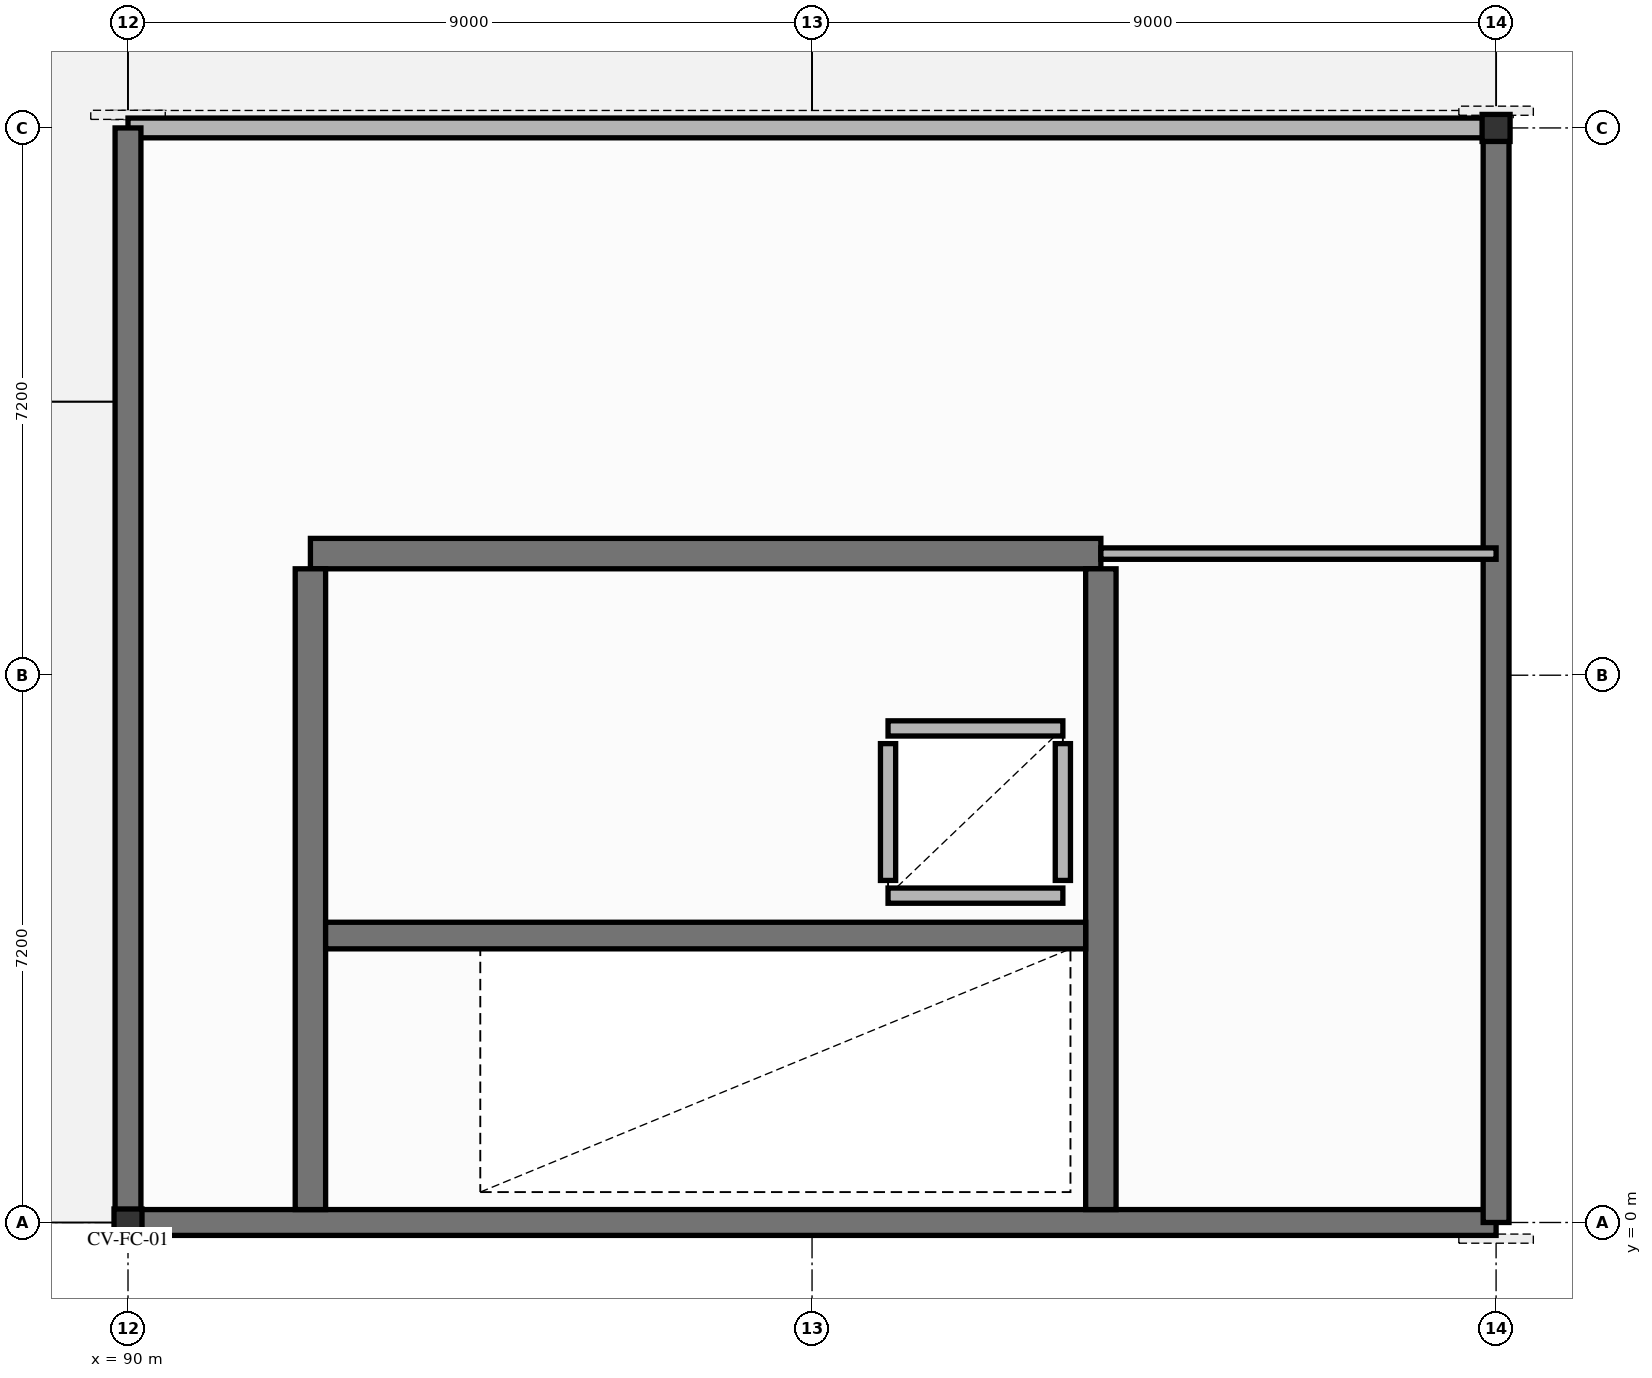
"""IFC4 building model, lengths in metres.
Left out: names, types, materials, properties, quantities, classifications, styles, units other than length and angle.
Written with IfcOpenShell. Run it as: python <this file> out.ifc"""

import sys

from ifc_helpers import new_model, si_unit, direction, frame, frame_2d, origin, origin_2d, place, context, subcontext, project, spatial, polyline, rectangle, i_section, outline, extrude, element, fill, save


model = new_model("IFC4")
c1 = context("Model", 3, precision=1e-05, world=origin(), true_north=direction((0.0, 1.0)))
c2 = subcontext(c1, "Body", "Model", "MODEL_VIEW")
j1 = project(units=[si_unit("LENGTHUNIT", "METRE"), si_unit("PLANEANGLEUNIT", "RADIAN")], contexts=[c1])
p1 = place(None, origin())
s1 = spatial("IfcSite", under=j1, at=p1, CompositionType="ELEMENT")
p2 = place(p1, origin())
s2 = spatial("IfcBuilding", under=s1, at=p2, CompositionType="ELEMENT")
p3 = place(p2, frame((0.0, 0.0, 8.94)))
s3 = spatial("IfcBuildingStorey", under=s2, at=p3, CompositionType="ELEMENT", Elevation=8.94)
p4 = place(p3, frame((90.0, 0.0, 0.0), z_axis=(0.0, 0.0, 1.0), x_axis=(1.0, 0.0, 0.0)))
e1 = element("IfcColumn", 1, at=p4, inside=s3, PredefinedType="COLUMN", context=c2, shape_type="SweptSolid", body=[
    extrude(i_section(OverallWidth=0.368, OverallDepth=0.356, WebThickness=0.011, FlangeThickness=0.018, at=origin_2d()), origin(), (0.0, 0.0, 1.0), 3.117),
])
p5 = place(p3, frame((108.0, 14.4, 0.0), z_axis=(0.0, 0.0, 1.0), x_axis=(1.0, 0.0, 0.0)))
e2 = element("IfcColumn", 2, at=p5, inside=s3, PredefinedType="COLUMN", context=c2, shape_type="SweptSolid", body=[
    extrude(i_section(OverallWidth=0.368, OverallDepth=0.356, WebThickness=0.011, FlangeThickness=0.018, at=origin_2d()), origin(), (0.0, 0.0, 1.0), 1.052),
])
p6 = place(p2, frame((0.0, 0.0, 5.1)))
s4 = spatial("IfcBuildingStorey", under=s2, at=p6, CompositionType="ELEMENT", Elevation=5.1)
p7 = place(p6, frame((81.0, 0.0, 0.0), z_axis=(0.0, 0.0, 1.0), x_axis=(1.0, 0.0, 0.0)))
e3 = element("IfcWall", 3, at=p7, inside=s4, PredefinedType="SOLIDWALL", context=c2, shape_type="SweptSolid", body=[
    extrude(rectangle(XDim=9.0, YDim=0.26, at=frame_2d((4.5, 0.0))), origin(), (0.0, 0.0, 1.0), 6.331),
])
p8 = place(p7, frame((1.8, 0.0, 0.65)))
e4 = element("IfcOpeningElement", 4, at=p8, cuts=e3, PredefinedType="OPENING", context=c2, shape_type="SweptSolid", body=[
    extrude(rectangle(XDim=2.2, YDim=1.95, at=frame_2d((1.1, 0.975))), frame((0.0, 0.14, 0.0), z_axis=(0.0, -1.0, 0.0), x_axis=(1.0, 0.0, 0.0)), (0.0, 0.0, 1.0), 0.28),
])
p9 = place(p7, frame((5.4, 0.0, 0.65)))
e5 = element("IfcOpeningElement", 5, at=p9, cuts=e3, PredefinedType="OPENING", context=c2, shape_type="SweptSolid", body=[
    extrude(rectangle(XDim=1.85, YDim=1.75, at=frame_2d((0.925, 0.875))), frame((0.0, 0.14, 0.0), z_axis=(0.0, -1.0, 0.0), x_axis=(1.0, 0.0, 0.0)), (0.0, 0.0, 1.0), 0.28),
])
p10 = place(p3, frame((90.0, 0.0, 0.0), z_axis=(0.0, 0.0, 1.0), x_axis=(1.0, 0.0, 0.0)))
e6 = element("IfcWall", 6, at=p10, inside=s3, PredefinedType="SOLIDWALL", context=c2, shape_type="SweptSolid", body=[
    extrude(rectangle(XDim=18.0, YDim=0.34, at=frame_2d((9.0, 0.0))), origin(), (0.0, 0.0, 1.0), 5.54),
])
p11 = place(p10, frame((4.8, 0.0, 0.701)))
e7 = element("IfcOpeningElement", 7, at=p11, cuts=e6, PredefinedType="OPENING", context=c2, shape_type="SweptSolid", body=[
    extrude(rectangle(XDim=1.85, YDim=1.75, at=frame_2d((0.925, 0.875))), frame((0.0, 0.18, 0.0), z_axis=(0.0, -1.0, 0.0), x_axis=(1.0, 0.0, 0.0)), (0.0, 0.0, 1.0), 0.36),
])
p12 = place(p10, frame((14.4, 0.0, 0.701)))
e8 = element("IfcOpeningElement", 8, at=p12, cuts=e6, PredefinedType="OPENING", context=c2, shape_type="SweptSolid", body=[
    extrude(rectangle(XDim=1.85, YDim=1.75, at=frame_2d((0.925, 0.875))), frame((0.0, 0.18, 0.0), z_axis=(0.0, -1.0, 0.0), x_axis=(1.0, 0.0, 0.0)), (0.0, 0.0, 1.0), 0.36),
])
p13 = place(p3, frame((90.0, 14.4, 0.0), z_axis=(0.0, 0.0, 1.0), x_axis=(1.0, 0.0, 0.0)))
e9 = element("IfcWall", 9, at=p13, inside=s3, PredefinedType="SOLIDWALL", context=c2, shape_type="SweptSolid", body=[
    extrude(rectangle(XDim=18.0, YDim=0.26, at=frame_2d((9.0, 0.0))), origin(), (0.0, 0.0, 1.0), 3.174),
])
p14 = place(p13, frame((3.0, 0.0, 0.9)))
e10 = element("IfcOpeningElement", 10, at=p14, cuts=e9, PredefinedType="OPENING", context=c2, shape_type="SweptSolid", body=[
    extrude(rectangle(XDim=2.2, YDim=1.95, at=frame_2d((1.1, 0.975))), frame((0.0, 0.14, 0.0), z_axis=(0.0, -1.0, 0.0), x_axis=(1.0, 0.0, 0.0)), (0.0, 0.0, 1.0), 0.28),
])
p15 = place(p13, frame((11.5, 0.0, 0.9)))
e11 = element("IfcOpeningElement", 11, at=p15, cuts=e9, PredefinedType="OPENING", context=c2, shape_type="SweptSolid", body=[
    extrude(rectangle(XDim=2.2, YDim=1.95, at=frame_2d((1.1, 0.975))), frame((0.0, 0.14, 0.0), z_axis=(0.0, -1.0, 0.0), x_axis=(1.0, 0.0, 0.0)), (0.0, 0.0, 1.0), 0.28),
])
p16 = place(p3, frame((90.0, 0.0, 0.0), z_axis=(0.0, 0.0, 1.0), x_axis=(0.0, 1.0, 0.0)))
e12 = element("IfcWall", 12, at=p16, inside=s3, PredefinedType="SOLIDWALL", context=c2, shape_type="SweptSolid", body=[
    extrude(outline(polyline([(0.0, 0.0), (14.4, 0.0), (14.4, 3.74), (0.0, 5.54), (0.0, 0.0)])), frame((0.0, 0.17, 0.0), z_axis=(0.0, -1.0, 0.0), x_axis=(1.0, 0.0, 0.0)), (0.0, 0.0, 1.0), 0.34),
])
p17 = place(p3, frame((108.0, 0.0, 0.0), z_axis=(0.0, 0.0, 1.0), x_axis=(0.0, 1.0, 0.0)))
e13 = element("IfcWall", 13, at=p17, inside=s3, PredefinedType="SOLIDWALL", context=c2, shape_type="SweptSolid", body=[
    extrude(outline(polyline([(0.0, 0.0), (14.4, 0.0), (14.4, 3.74), (0.0, 5.54), (0.0, 0.0)])), frame((0.0, 0.17, 0.0), z_axis=(0.0, -1.0, 0.0), x_axis=(1.0, 0.0, 0.0)), (0.0, 0.0, 1.0), 0.34),
])
p18 = place(p17, frame((4.2, 0.0, 0.9)))
e14 = element("IfcOpeningElement", 14, at=p18, cuts=e13, PredefinedType="OPENING", context=c2, shape_type="SweptSolid", body=[
    extrude(rectangle(XDim=1.2, YDim=2.1, at=frame_2d((0.6, 1.05))), frame((0.0, 0.18, 0.0), z_axis=(0.0, -1.0, 0.0), x_axis=(1.0, 0.0, 0.0)), (0.0, 0.0, 1.0), 0.36),
])
p19 = place(p3, frame((92.4, 8.8, 0.0), z_axis=(0.0, 0.0, 1.0), x_axis=(1.0, 0.0, 0.0)))
e15 = element("IfcWall", 15, at=p19, inside=s3, PredefinedType="SHEAR", context=c2, shape_type="SweptSolid", body=[
    extrude(rectangle(XDim=10.4, YDim=0.4, at=frame_2d((5.2, 0.0))), origin(), (0.0, 0.0, 1.0), 3.53),
])
p20 = place(p19, frame((2.4, 0.0, 0.0)))
e16 = element("IfcOpeningElement", 16, at=p20, cuts=e15, PredefinedType="OPENING", context=c2, shape_type="SweptSolid", body=[
    extrude(rectangle(XDim=1.5, YDim=2.2, at=frame_2d((0.75, 1.1))), frame((0.0, 0.21, 0.0), z_axis=(0.0, -1.0, 0.0), x_axis=(1.0, 0.0, 0.0)), (0.0, 0.0, 1.0), 0.42),
])
for number, where, z_axis, x_axis in (
    (17, (92.4, 0.17, 0.0), (0.0, 0.0, 1.0), (0.0, 1.0, 0.0)),
    (18, (102.8, 0.17, 0.0), (0.0, 0.0, 1.0), (0.0, 1.0, 0.0)),
):
    element("IfcWall", number, at=place(p3, frame(where, z_axis=z_axis, x_axis=x_axis)), inside=s3, PredefinedType="SHEAR", context=c2, shape_type="SweptSolid", body=[
        extrude(rectangle(XDim=8.43, YDim=0.4, at=frame_2d((4.215, 0.0))), origin(), (0.0, 0.0, 1.0), 3.53),
    ])
p21 = place(p3, frame((92.6, 3.775, 0.0), z_axis=(0.0, 0.0, 1.0), x_axis=(1.0, 0.0, 0.0)))
e19 = element("IfcWall", 19, at=p21, inside=s3, PredefinedType="SHEAR", context=c2, shape_type="SweptSolid", body=[
    extrude(rectangle(XDim=10.0, YDim=0.35, at=frame_2d((5.0, 0.0))), origin(), (0.0, 0.0, 1.0), 3.53),
])
p22 = place(p21, frame((0.45, 0.0, 0.0)))
e20 = element("IfcOpeningElement", 20, at=p22, cuts=e19, PredefinedType="OPENING", context=c2, shape_type="SweptSolid", body=[
    extrude(rectangle(XDim=1.05, YDim=2.2, at=frame_2d((0.525, 1.1))), frame((0.0, 0.185, 0.0), z_axis=(0.0, -1.0, 0.0), x_axis=(1.0, 0.0, 0.0)), (0.0, 0.0, 1.0), 0.37),
])
for number, where, z_axis, x_axis in (
    (21, (100.0, 4.3, 0.0), (0.0, 0.0, 1.0), (1.0, 0.0, 0.0)),
    (22, (100.0, 6.5, 0.0), (0.0, 0.0, 1.0), (1.0, 0.0, 0.0)),
):
    element("IfcWall", number, at=place(p3, frame(where, z_axis=z_axis, x_axis=x_axis)), inside=s3, PredefinedType="PARTITIONING", context=c2, shape_type="SweptSolid", body=[
        extrude(rectangle(XDim=2.3, YDim=0.2, at=frame_2d((1.15, 0.0))), origin(), (0.0, 0.0, 1.0), 3.53),
    ])
p23 = place(p3, frame((100.0, 4.5, 0.0), z_axis=(0.0, 0.0, 1.0), x_axis=(0.0, 1.0, 0.0)))
e23 = element("IfcWall", 23, at=p23, inside=s3, PredefinedType="PARTITIONING", context=c2, shape_type="SweptSolid", body=[
    extrude(rectangle(XDim=1.8, YDim=0.2, at=frame_2d((0.9, 0.0))), origin(), (0.0, 0.0, 1.0), 3.53),
])
p24 = place(p23, frame((0.45, 0.0, 0.0)))
e24 = element("IfcOpeningElement", 24, at=p24, cuts=e23, PredefinedType="OPENING", context=c2, shape_type="SweptSolid", body=[
    extrude(rectangle(XDim=0.9, YDim=2.1, at=frame_2d((0.45, 1.05))), frame((0.0, 0.11, 0.0), z_axis=(0.0, -1.0, 0.0), x_axis=(1.0, 0.0, 0.0)), (0.0, 0.0, 1.0), 0.22),
])
p25 = place(p3, frame((102.3, 4.5, 0.0), z_axis=(0.0, 0.0, 1.0), x_axis=(0.0, 1.0, 0.0)))
e25 = element("IfcWall", 25, at=p25, inside=s3, PredefinedType="PARTITIONING", context=c2, shape_type="SweptSolid", body=[
    extrude(rectangle(XDim=1.8, YDim=0.2, at=frame_2d((0.9, 0.0))), origin(), (0.0, 0.0, 1.0), 3.53),
])
p26 = place(p3, frame((102.8, 8.8, 0.0), z_axis=(0.0, 0.0, 1.0), x_axis=(1.0, 0.0, 0.0)))
e26 = element("IfcWall", 26, at=p26, inside=s3, PredefinedType="PARTITIONING", context=c2, shape_type="SweptSolid", body=[
    extrude(rectangle(XDim=5.2, YDim=0.15, at=frame_2d((2.6, 0.0))), origin(), (0.0, 0.0, 1.0), 3.53),
])
p27 = place(p26, frame((1.8, 0.0, 0.0)))
e27 = element("IfcOpeningElement", 27, at=p27, cuts=e26, PredefinedType="OPENING", context=c2, shape_type="SweptSolid", body=[
    extrude(rectangle(XDim=1.0, YDim=2.15, at=frame_2d((0.5, 1.075))), frame((0.0, 0.085, 0.0), z_axis=(0.0, -1.0, 0.0), x_axis=(1.0, 0.0, 0.0)), (0.0, 0.0, 1.0), 0.17),
])
p28 = place(p11, origin())
e28 = element("IfcWindow", 28, at=p28, inside=s3, PartitioningType="SINGLE_PANEL", PredefinedType="WINDOW", context=c2, shape_type="SweptSolid", body=[
    extrude(rectangle(XDim=1.85, YDim=1.75, at=frame_2d((0.925, 0.875))), frame((0.0, 0.03, 0.0), z_axis=(0.0, -1.0, 0.0), x_axis=(1.0, 0.0, 0.0)), (0.0, 0.0, 1.0), 0.06),
])
fill(e7, e28)
p29 = place(p12, origin())
e29 = element("IfcWindow", 29, at=p29, inside=s3, PartitioningType="SINGLE_PANEL", PredefinedType="WINDOW", context=c2, shape_type="SweptSolid", body=[
    extrude(rectangle(XDim=1.85, YDim=1.75, at=frame_2d((0.925, 0.875))), frame((0.0, 0.03, 0.0), z_axis=(0.0, -1.0, 0.0), x_axis=(1.0, 0.0, 0.0)), (0.0, 0.0, 1.0), 0.06),
])
fill(e8, e29)
p30 = place(p14, origin())
e30 = element("IfcWindow", 30, at=p30, inside=s3, PartitioningType="SINGLE_PANEL", PredefinedType="WINDOW", context=c2, shape_type="SweptSolid", body=[
    extrude(rectangle(XDim=2.2, YDim=1.95, at=frame_2d((1.1, 0.975))), frame((0.0, 0.03, 0.0), z_axis=(0.0, -1.0, 0.0), x_axis=(1.0, 0.0, 0.0)), (0.0, 0.0, 1.0), 0.06),
])
fill(e10, e30)
p31 = place(p15, origin())
e31 = element("IfcWindow", 31, at=p31, inside=s3, PartitioningType="SINGLE_PANEL", PredefinedType="WINDOW", context=c2, shape_type="SweptSolid", body=[
    extrude(rectangle(XDim=2.2, YDim=1.95, at=frame_2d((1.1, 0.975))), frame((0.0, 0.03, 0.0), z_axis=(0.0, -1.0, 0.0), x_axis=(1.0, 0.0, 0.0)), (0.0, 0.0, 1.0), 0.06),
])
fill(e11, e31)
p32 = place(p18, origin())
e32 = element("IfcWindow", 32, at=p32, inside=s3, PartitioningType="SINGLE_PANEL", PredefinedType="WINDOW", context=c2, shape_type="SweptSolid", body=[
    extrude(rectangle(XDim=1.2, YDim=2.1, at=frame_2d((0.6, 1.05))), frame((0.0, 0.03, 0.0), z_axis=(0.0, -1.0, 0.0), x_axis=(1.0, 0.0, 0.0)), (0.0, 0.0, 1.0), 0.06),
])
fill(e14, e32)
p33 = place(p20, origin())
e33 = element("IfcDoor", 33, at=p33, inside=s3, OperationType="DOUBLE_DOOR_SINGLE_SWING", PredefinedType="DOOR", context=c2, shape_type="SweptSolid", body=[
    extrude(rectangle(XDim=1.5, YDim=2.2, at=frame_2d((0.75, 1.1))), frame((0.0, 0.025, 0.0), z_axis=(0.0, -1.0, 0.0), x_axis=(1.0, 0.0, 0.0)), (0.0, 0.0, 1.0), 0.05),
])
fill(e16, e33)
p34 = place(p22, origin())
e34 = element("IfcDoor", 34, at=p34, inside=s3, OperationType="SINGLE_SWING_LEFT", PredefinedType="DOOR", context=c2, shape_type="SweptSolid", body=[
    extrude(rectangle(XDim=1.05, YDim=2.2, at=frame_2d((0.525, 1.1))), frame((0.0, 0.025, 0.0), z_axis=(0.0, -1.0, 0.0), x_axis=(1.0, 0.0, 0.0)), (0.0, 0.0, 1.0), 0.05),
])
fill(e20, e34)
p35 = place(p24, origin())
e35 = element("IfcDoor", 35, at=p35, inside=s3, OperationType="SINGLE_SWING_LEFT", PredefinedType="DOOR", context=c2, shape_type="SweptSolid", body=[
    extrude(rectangle(XDim=0.9, YDim=2.1, at=frame_2d((0.45, 1.05))), frame((0.0, 0.025, 0.0), z_axis=(0.0, -1.0, 0.0), x_axis=(1.0, 0.0, 0.0)), (0.0, 0.0, 1.0), 0.05),
])
fill(e24, e35)
p36 = place(p27, origin())
e36 = element("IfcDoor", 36, at=p36, inside=s3, OperationType="SINGLE_SWING_RIGHT", PredefinedType="DOOR", context=c2, shape_type="SweptSolid", body=[
    extrude(rectangle(XDim=1.0, YDim=2.15, at=frame_2d((0.5, 1.075))), frame((0.0, 0.025, 0.0), z_axis=(0.0, -1.0, 0.0), x_axis=(1.0, 0.0, 0.0)), (0.0, 0.0, 1.0), 0.05),
])
fill(e27, e36)
save(model, sys.argv[1])
